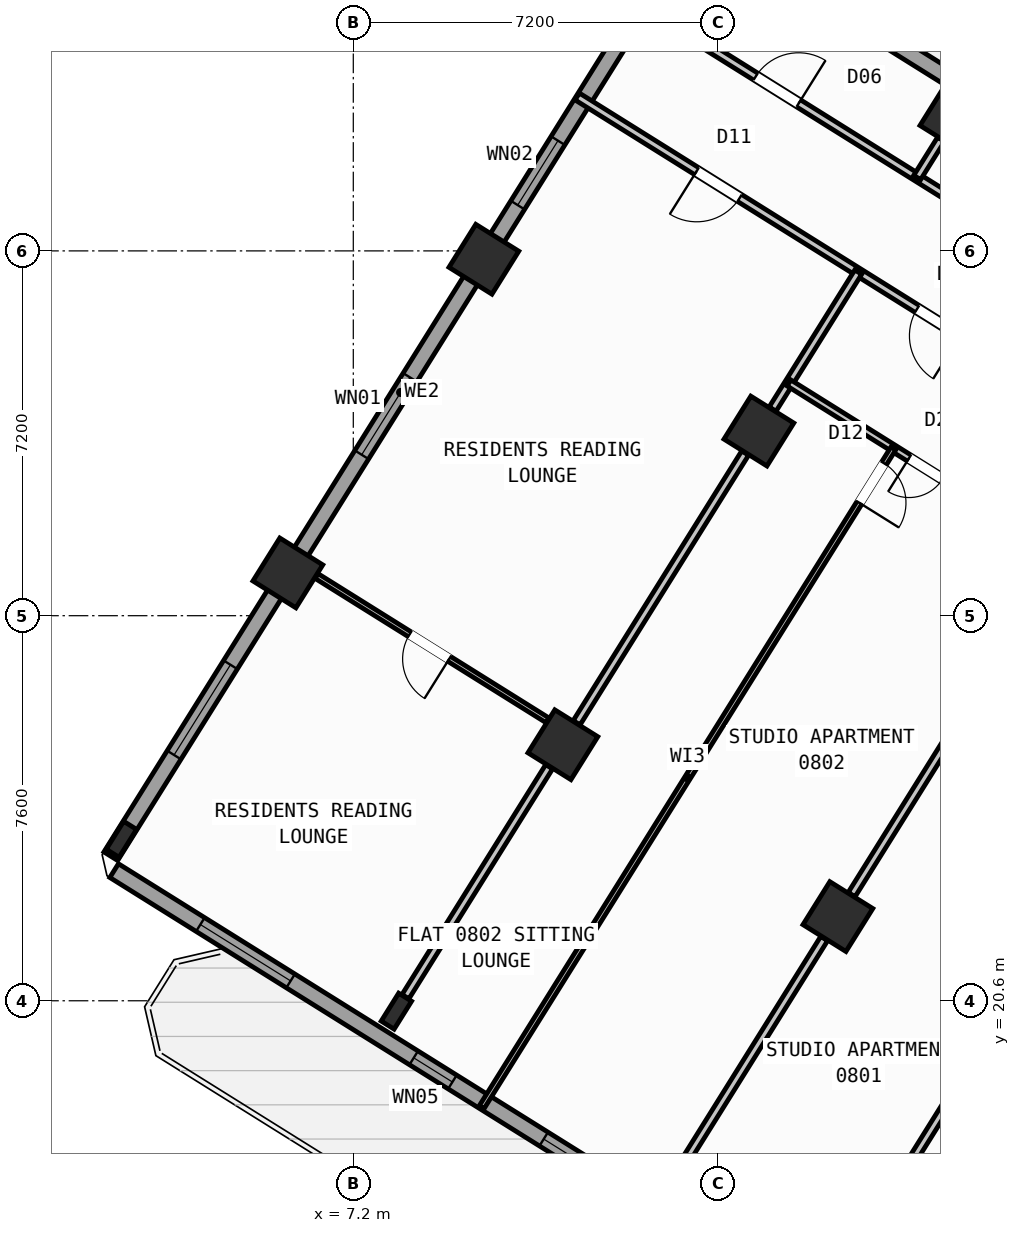
"""IFC4 building model, lengths in metres.
Left out: names, types, materials, properties, quantities, classifications, styles, units other than length and angle.
Written with IfcOpenShell. Run it as: python <this file> out.ifc"""

import sys

from ifc_helpers import new_model, si_unit, direction, frame, frame_2d, origin, origin_2d, place, context, subcontext, project, spatial, rectangle, hollow_rectangle, i_section, extrude, source, transform, mapped, element, fill, save


model = new_model("IFC4")
c1 = context("Model", 3, precision=1e-05, world=origin(), true_north=direction((0.0, 1.0)))
c2 = subcontext(c1, "Body", "Model", "MODEL_VIEW")
j1 = project(units=[si_unit("LENGTHUNIT", "METRE"), si_unit("PLANEANGLEUNIT", "RADIAN")], contexts=[c1])
p1 = place(None, origin())
s1 = spatial("IfcSite", under=j1, at=p1, CompositionType="ELEMENT")
p2 = place(p1, origin())
s2 = spatial("IfcBuilding", under=s1, at=p2, CompositionType="ELEMENT")
p3 = place(p2, frame((0.0, 0.0, 34.8)))
s3 = spatial("IfcBuildingStorey", under=s2, at=p3, CompositionType="ELEMENT", Elevation=34.8)
m1 = source(origin(), c2, "Body", "SweptSolid", [
    extrude(hollow_rectangle(XDim=1.0, YDim=1.0, WallThickness=0.04, at=origin_2d()), origin(), (0.0, 0.0, 1.0), 3.6),
])
for number, where, z_axis, x_axis in (
    (1, (16.764, 22.261, 0.0), (0.0, 0.0, 1.0), (-0.848, 0.53, 0.0)),
    (2, (19.073, 38.034, 0.0), (0.0, 0.0, 1.0), (-0.848, 0.53, 0.0)),
    (3, (15.205, 31.844, 0.0), (0.0, 0.0, 1.0), (-0.848, 0.53, 0.0)),
    (4, (11.336, 25.653, 0.0), (0.0, 0.0, 1.0), (-0.848, 0.53, 0.0)),
):
    element("IfcColumn", number, at=place(p3, frame(where, z_axis=z_axis, x_axis=x_axis)), inside=s3, PredefinedType="COLUMN", context=c2, shape_type="MappedRepresentation", body=[
        mapped(m1, transform((0.0, 0.0, 0.0), scale=1.0)),
    ])
m2 = source(origin(), c2, "Body", "SweptSolid", [
    extrude(i_section(OverallWidth=0.3, OverallDepth=0.65, WebThickness=0.016, FlangeThickness=0.031, at=origin_2d()), origin(), (0.0, 0.0, 1.0), 3.6),
])
p4 = place(p3, frame((8.051, 20.395, 0.0), z_axis=(0.0, 0.0, 1.0), x_axis=(-0.848048096156, 0.529919264233, 0.0)))
e5 = element("IfcColumn", 5, at=p4, inside=s3, PredefinedType="COLUMN", context=c2, shape_type="MappedRepresentation", body=[
    mapped(m2, transform((0.0, 0.0, 0.0), scale=1.0)),
])
for number, where, z_axis, x_axis in (
    (6, (9.777, 35.235, 0.0), (0.0, 0.0, 1.0), (-0.848, 0.53, 0.0)),
    (7, (5.909, 29.044, 0.0), (0.0, 0.0, 1.0), (-0.848, 0.53, 0.0)),
):
    element("IfcColumn", number, at=place(p3, frame(where, z_axis=z_axis, x_axis=x_axis)), inside=s3, PredefinedType="COLUMN", context=c2, shape_type="MappedRepresentation", body=[
        mapped(m1, transform((0.0, 0.0, 0.0), scale=1.0)),
    ])
p5 = place(p3, frame((2.623, 23.786, 0.0), z_axis=(0.0, 0.0, 1.0), x_axis=(-0.848048096156, 0.529919264233, 0.0)))
e8 = element("IfcColumn", 8, at=p5, inside=s3, PredefinedType="COLUMN", context=c2, shape_type="MappedRepresentation", body=[
    mapped(m2, transform((0.0, 0.0, 0.0), scale=1.0)),
])
p6 = place(p3, frame((29.268, 6.429, 0.0), z_axis=(0.0, 0.0, 1.0), x_axis=(-0.848049971435, 0.529916263149, 0.0)))
e9 = element("IfcWall", 9, at=p6, inside=s3, PredefinedType="STANDARD", context=c2, shape_type="SweptSolid", body=[
    extrude(rectangle(XDim=31.588, YDim=0.32, at=frame_2d((15.794, 0.0))), origin(), (0.0, 0.0, 1.0), 3.35),
])
p7 = place(p6, frame((16.362, 0.0, 0.0)))
e10 = element("IfcOpeningElement", 10, at=p7, cuts=e9, PredefinedType="OPENING", context=c2, shape_type="SweptSolid", body=[
    extrude(rectangle(XDim=1.2, YDim=2.15, at=frame_2d((0.6, 1.075))), frame((0.0, 0.17, 0.0), z_axis=(0.0, -1.0, 0.0), x_axis=(1.0, 0.0, 0.0)), (0.0, 0.0, 1.0), 0.34),
])
p8 = place(p6, frame((2.989, 0.0, 0.8)))
e11 = element("IfcOpeningElement", 11, at=p8, cuts=e9, PredefinedType="OPENING", context=c2, shape_type="SweptSolid", body=[
    extrude(rectangle(XDim=2.1, YDim=1.55, at=frame_2d((1.05, 0.775))), frame((0.0, 0.17, 0.0), z_axis=(0.0, -1.0, 0.0), x_axis=(1.0, 0.0, 0.0)), (0.0, 0.0, 1.0), 0.34),
])
p9 = place(p6, frame((8.359, 0.0, 0.8)))
e12 = element("IfcOpeningElement", 12, at=p9, cuts=e9, PredefinedType="OPENING", context=c2, shape_type="SweptSolid", body=[
    extrude(rectangle(XDim=2.1, YDim=1.55, at=frame_2d((1.05, 0.775))), frame((0.0, 0.17, 0.0), z_axis=(0.0, -1.0, 0.0), x_axis=(1.0, 0.0, 0.0)), (0.0, 0.0, 1.0), 0.34),
])
p10 = place(p6, frame((13.284, 0.0, 0.95)))
e13 = element("IfcOpeningElement", 13, at=p10, cuts=e9, PredefinedType="OPENING", context=c2, shape_type="SweptSolid", body=[
    extrude(rectangle(XDim=1.2, YDim=1.4, at=frame_2d((0.6, 0.7))), frame((0.0, 0.17, 0.0), z_axis=(0.0, -1.0, 0.0), x_axis=(1.0, 0.0, 0.0)), (0.0, 0.0, 1.0), 0.34),
])
p11 = place(p6, frame((20.39, 0.0, 0.95)))
e14 = element("IfcOpeningElement", 14, at=p11, cuts=e9, PredefinedType="OPENING", context=c2, shape_type="SweptSolid", body=[
    extrude(rectangle(XDim=1.2, YDim=1.4, at=frame_2d((0.6, 0.7))), frame((0.0, 0.17, 0.0), z_axis=(0.0, -1.0, 0.0), x_axis=(1.0, 0.0, 0.0)), (0.0, 0.0, 1.0), 0.34),
])
p12 = place(p6, frame((23.715, 0.0, 1.0)))
e15 = element("IfcOpeningElement", 15, at=p12, cuts=e9, PredefinedType="OPENING", context=c2, shape_type="SweptSolid", body=[
    extrude(rectangle(XDim=0.9, YDim=1.25, at=frame_2d((0.45, 0.625))), frame((0.0, 0.17, 0.0), z_axis=(0.0, -1.0, 0.0), x_axis=(1.0, 0.0, 0.0)), (0.0, 0.0, 1.0), 0.34),
])
p13 = place(p6, frame((27.481, 0.0, 0.8)))
e16 = element("IfcOpeningElement", 16, at=p13, cuts=e9, PredefinedType="OPENING", context=c2, shape_type="SweptSolid", body=[
    extrude(rectangle(XDim=2.1, YDim=1.55, at=frame_2d((1.05, 0.775))), frame((0.0, 0.17, 0.0), z_axis=(0.0, -1.0, 0.0), x_axis=(1.0, 0.0, 0.0)), (0.0, 0.0, 1.0), 0.34),
])
p14 = place(p3, frame((2.415, 23.452, 0.0), z_axis=(0.0, 0.0, 1.0), x_axis=(0.52991049553, 0.848053575387, 0.0)))
e17 = element("IfcWall", 17, at=p14, inside=s3, PredefinedType="STANDARD", context=c2, shape_type="SweptSolid", body=[
    extrude(rectangle(XDim=21.587, YDim=0.32, at=frame_2d((10.794, 0.0))), origin(), (0.0, 0.0, 1.0), 2.725),
])
p15 = place(p14, frame((2.356, 0.0, 0.8)))
e18 = element("IfcOpeningElement", 18, at=p15, cuts=e17, PredefinedType="OPENING", context=c2, shape_type="SweptSolid", body=[
    extrude(rectangle(XDim=2.1, YDim=1.55, at=frame_2d((1.05, 0.775))), frame((0.0, 0.17, 0.0), z_axis=(0.0, -1.0, 0.0), x_axis=(1.0, 0.0, 0.0)), (0.0, 0.0, 1.0), 0.34),
])
p16 = place(p14, frame((9.344, 0.0, 0.85)))
e19 = element("IfcOpeningElement", 19, at=p16, cuts=e17, PredefinedType="OPENING", context=c2, shape_type="SweptSolid", body=[
    extrude(rectangle(XDim=1.8, YDim=1.5, at=frame_2d((0.9, 0.75))), frame((0.0, 0.17, 0.0), z_axis=(0.0, -1.0, 0.0), x_axis=(1.0, 0.0, 0.0)), (0.0, 0.0, 1.0), 0.34),
])
p17 = place(p14, frame((15.154, 0.0, 0.85)))
e20 = element("IfcOpeningElement", 20, at=p17, cuts=e17, PredefinedType="OPENING", context=c2, shape_type="SweptSolid", body=[
    extrude(rectangle(XDim=1.5, YDim=1.5, at=frame_2d((0.75, 0.75))), frame((0.0, 0.17, 0.0), z_axis=(0.0, -1.0, 0.0), x_axis=(1.0, 0.0, 0.0)), (0.0, 0.0, 1.0), 0.34),
])
p18 = place(p3, frame((14.138, 41.825, 0.0), z_axis=(0.0, 0.0, 1.0), x_axis=(0.848046498049, -0.529921821731, 0.0)))
e21 = element("IfcWall", 21, at=p18, inside=s3, PredefinedType="STANDARD", context=c2, shape_type="SweptSolid", body=[
    extrude(rectangle(XDim=31.588, YDim=0.32, at=frame_2d((15.794, 0.0))), origin(), (0.0, 0.0, 1.0), 3.35),
])
p19 = place(p18, frame((3.369, 0.0, 0.0)))
e22 = element("IfcOpeningElement", 22, at=p19, cuts=e21, PredefinedType="OPENING", context=c2, shape_type="SweptSolid", body=[
    extrude(rectangle(XDim=1.05, YDim=2.15, at=frame_2d((0.525, 1.075))), frame((0.0, 0.17, 0.0), z_axis=(0.0, -1.0, 0.0), x_axis=(1.0, 0.0, 0.0)), (0.0, 0.0, 1.0), 0.34),
])
p20 = place(p18, frame((0.946, 0.0, 0.85)))
e23 = element("IfcOpeningElement", 23, at=p20, cuts=e21, PredefinedType="OPENING", context=c2, shape_type="SweptSolid", body=[
    extrude(rectangle(XDim=1.8, YDim=1.5, at=frame_2d((0.9, 0.75))), frame((0.0, 0.17, 0.0), z_axis=(0.0, -1.0, 0.0), x_axis=(1.0, 0.0, 0.0)), (0.0, 0.0, 1.0), 0.34),
])
p21 = place(p18, frame((8.46, 0.0, 0.85)))
e24 = element("IfcOpeningElement", 24, at=p21, cuts=e21, PredefinedType="OPENING", context=c2, shape_type="SweptSolid", body=[
    extrude(rectangle(XDim=1.8, YDim=1.5, at=frame_2d((0.9, 0.75))), frame((0.0, 0.17, 0.0), z_axis=(0.0, -1.0, 0.0), x_axis=(1.0, 0.0, 0.0)), (0.0, 0.0, 1.0), 0.34),
])
p22 = place(p18, frame((13.899, 0.0, 0.85)))
e25 = element("IfcOpeningElement", 25, at=p22, cuts=e21, PredefinedType="OPENING", context=c2, shape_type="SweptSolid", body=[
    extrude(rectangle(XDim=1.5, YDim=1.5, at=frame_2d((0.75, 0.75))), frame((0.0, 0.17, 0.0), z_axis=(0.0, -1.0, 0.0), x_axis=(1.0, 0.0, 0.0)), (0.0, 0.0, 1.0), 0.34),
])
p23 = place(p18, frame((22.019, 0.0, 0.95)))
e26 = element("IfcOpeningElement", 26, at=p23, cuts=e21, PredefinedType="OPENING", context=c2, shape_type="SweptSolid", body=[
    extrude(rectangle(XDim=1.2, YDim=1.4, at=frame_2d((0.6, 0.7))), frame((0.0, 0.17, 0.0), z_axis=(0.0, -1.0, 0.0), x_axis=(1.0, 0.0, 0.0)), (0.0, 0.0, 1.0), 0.34),
])
p24 = place(p18, frame((27.569, 0.0, 0.95)))
e27 = element("IfcOpeningElement", 27, at=p24, cuts=e21, PredefinedType="OPENING", context=c2, shape_type="SweptSolid", body=[
    extrude(rectangle(XDim=1.2, YDim=1.4, at=frame_2d((0.6, 0.7))), frame((0.0, 0.17, 0.0), z_axis=(0.0, -1.0, 0.0), x_axis=(1.0, 0.0, 0.0)), (0.0, 0.0, 1.0), 0.34),
])
p25 = place(p3, frame((25.807, 29.582, 0.0), z_axis=(0.0, 0.0, 1.0), x_axis=(-0.529918119251, -0.84804881162, 0.0)))
e28 = element("IfcWall", 28, at=p25, inside=s3, PredefinedType="PARTITIONING", context=c2, shape_type="SweptSolid", body=[
    extrude(rectangle(XDim=17.65, YDim=0.16, at=frame_2d((8.825, 0.0))), origin(), (0.0, 0.0, 1.0), 3.34),
])
p26 = place(p3, frame((26.973, 31.447, 0.0), z_axis=(0.0, 0.0, 1.0), x_axis=(-0.848048310262, 0.529918921593, 0.0)))
e29 = element("IfcWall", 29, at=p26, inside=s3, PredefinedType="PARTITIONING", context=c2, shape_type="SweptSolid", body=[
    extrude(rectangle(XDim=16.73, YDim=0.16, at=frame_2d((8.365, 0.0))), origin(), (0.0, 0.0, 1.0), 3.34),
])
p27 = place(p26, frame((1.588, 0.0, 0.0)))
e30 = element("IfcOpeningElement", 30, at=p27, cuts=e29, PredefinedType="OPENING", context=c2, shape_type="SweptSolid", body=[
    extrude(rectangle(XDim=1.0, YDim=2.1, at=frame_2d((0.5, 1.05))), frame((0.0, 0.09, 0.0), z_axis=(0.0, -1.0, 0.0), x_axis=(1.0, 0.0, 0.0)), (0.0, 0.0, 1.0), 0.18),
])
p28 = place(p26, frame((6.685, 0.0, 0.0)))
e31 = element("IfcOpeningElement", 31, at=p28, cuts=e29, PredefinedType="OPENING", context=c2, shape_type="SweptSolid", body=[
    extrude(rectangle(XDim=1.0, YDim=2.1, at=frame_2d((0.5, 1.05))), frame((0.0, 0.09, 0.0), z_axis=(0.0, -1.0, 0.0), x_axis=(1.0, 0.0, 0.0)), (0.0, 0.0, 1.0), 0.18),
])
p29 = place(p26, frame((12.951, 0.0, 0.0)))
e32 = element("IfcOpeningElement", 32, at=p29, cuts=e29, PredefinedType="OPENING", context=c2, shape_type="SweptSolid", body=[
    extrude(rectangle(XDim=1.0, YDim=2.1, at=frame_2d((0.5, 1.05))), frame((0.0, 0.09, 0.0), z_axis=(0.0, -1.0, 0.0), x_axis=(1.0, 0.0, 0.0)), (0.0, 0.0, 1.0), 0.18),
])
p30 = place(p3, frame((25.807, 29.582, 0.0), z_axis=(0.0, 0.0, 1.0), x_axis=(-0.848052408131, 0.529912363569, 0.0)))
e33 = element("IfcWall", 33, at=p30, inside=s3, PredefinedType="PARTITIONING", context=c2, shape_type="SweptSolid", body=[
    extrude(rectangle(XDim=16.73, YDim=0.16, at=frame_2d((8.365, 0.0))), origin(), (0.0, 0.0, 1.0), 3.34),
])
p31 = place(p30, frame((2.22, 0.0, 0.0)))
e34 = element("IfcOpeningElement", 34, at=p31, cuts=e33, PredefinedType="OPENING", context=c2, shape_type="SweptSolid", body=[
    extrude(rectangle(XDim=0.86, YDim=2.05, at=frame_2d((0.43, 1.025))), frame((0.0, 0.09, 0.0), z_axis=(0.0, -1.0, 0.0), x_axis=(1.0, 0.0, 0.0)), (0.0, 0.0, 1.0), 0.18),
])
p32 = place(p30, frame((7.82, 0.0, 0.0)))
e35 = element("IfcOpeningElement", 35, at=p32, cuts=e33, PredefinedType="OPENING", context=c2, shape_type="SweptSolid", body=[
    extrude(rectangle(XDim=1.0, YDim=2.1, at=frame_2d((0.5, 1.05))), frame((0.0, 0.09, 0.0), z_axis=(0.0, -1.0, 0.0), x_axis=(1.0, 0.0, 0.0)), (0.0, 0.0, 1.0), 0.18),
])
p33 = place(p30, frame((12.95, 0.0, 0.0)))
e36 = element("IfcOpeningElement", 36, at=p33, cuts=e33, PredefinedType="OPENING", context=c2, shape_type="SweptSolid", body=[
    extrude(rectangle(XDim=1.0, YDim=2.1, at=frame_2d((0.5, 1.05))), frame((0.0, 0.09, 0.0), z_axis=(0.0, -1.0, 0.0), x_axis=(1.0, 0.0, 0.0)), (0.0, 0.0, 1.0), 0.18),
])
p34 = place(p3, frame((20.361, 28.018, 0.0), z_axis=(0.0, 0.0, 1.0), x_axis=(-0.529915015264, -0.848050751193, 0.0)))
e37 = element("IfcWall", 37, at=p34, inside=s3, PredefinedType="PARTITIONING", context=c2, shape_type="SweptSolid", body=[
    extrude(rectangle(XDim=6.276, YDim=0.16, at=frame_2d((3.138, 0.0))), origin(), (0.0, 0.0, 1.0), 2.725),
])
p35 = place(p3, frame((16.492, 21.827, 0.0), z_axis=(0.0, 0.0, 1.0), x_axis=(-0.529904608059, -0.848057254175, 0.0)))
e38 = element("IfcWall", 38, at=p35, inside=s3, PredefinedType="PARTITIONING", context=c2, shape_type="SweptSolid", body=[
    extrude(rectangle(XDim=5.351, YDim=0.16, at=frame_2d((2.675, 0.0))), origin(), (0.0, 0.0, 1.0), 2.725),
])
p36 = place(p3, frame((17.165, 34.981, 0.0), z_axis=(0.0, 0.0, 1.0), x_axis=(-0.529930102756, -0.848041323399, 0.0)))
e39 = element("IfcWall", 39, at=p36, inside=s3, PredefinedType="PARTITIONING", context=c2, shape_type="SweptSolid", body=[
    extrude(rectangle(XDim=3.188, YDim=0.16, at=frame_2d((1.594, 0.0))), origin(), (0.0, 0.0, 1.0), 2.725),
])
p37 = place(p3, frame((14.933, 31.409, 0.0), z_axis=(0.0, 0.0, 1.0), x_axis=(-0.529897533635, -0.848061674554, 0.0)))
e40 = element("IfcWall", 40, at=p37, inside=s3, PredefinedType="PARTITIONING", context=c2, shape_type="SweptSolid", body=[
    extrude(rectangle(XDim=6.276, YDim=0.16, at=frame_2d((3.138, 0.0))), origin(), (0.0, 0.0, 1.0), 2.725),
])
p38 = place(p3, frame((11.065, 25.219, 0.0), z_axis=(0.0, 0.0, 1.0), x_axis=(-0.529904608059, -0.848057254175, 0.0)))
e41 = element("IfcWall", 41, at=p38, inside=s3, PredefinedType="PARTITIONING", context=c2, shape_type="SweptSolid", body=[
    extrude(rectangle(XDim=5.351, YDim=0.16, at=frame_2d((2.675, 0.0))), origin(), (0.0, 0.0, 1.0), 2.725),
])
p39 = place(p3, frame((21.226, 29.402, 0.0), z_axis=(0.0, 0.0, 1.0), x_axis=(-0.848039019877, 0.529933789039, 0.0)))
e42 = element("IfcWall", 42, at=p39, inside=s3, PredefinedType="PLUMBINGWALL", context=c2, shape_type="SweptSolid", body=[
    extrude(rectangle(XDim=6.4, YDim=0.14, at=frame_2d((3.2, 0.0))), origin(), (0.0, 0.0, 1.0), 3.34),
])
p40 = place(p39, frame((2.824, 0.0, 0.0)))
e43 = element("IfcOpeningElement", 43, at=p40, cuts=e42, PredefinedType="OPENING", context=c2, shape_type="SweptSolid", body=[
    extrude(rectangle(XDim=0.78, YDim=2.05, at=frame_2d((0.39, 1.025))), frame((0.0, 0.08, 0.0), z_axis=(0.0, -1.0, 0.0), x_axis=(1.0, 0.0, 0.0)), (0.0, 0.0, 1.0), 0.16),
])
p41 = place(p3, frame((17.861, 31.505, 0.0), z_axis=(0.0, 0.0, 1.0), x_axis=(-0.529928839727, -0.848042112649, 0.0)))
e44 = element("IfcWall", 44, at=p41, inside=s3, PredefinedType="PARTITIONING", context=c2, shape_type="SweptSolid", body=[
    extrude(rectangle(XDim=15.34, YDim=0.11, at=frame_2d((7.67, 0.0))), origin(), (0.0, 0.0, 1.0), 3.34),
])
p42 = place(p41, frame((0.35, 0.0, 0.0)))
e45 = element("IfcOpeningElement", 45, at=p42, cuts=e44, PredefinedType="OPENING", context=c2, shape_type="SweptSolid", body=[
    extrude(rectangle(XDim=0.92, YDim=2.08, at=frame_2d((0.46, 1.04))), frame((0.0, 0.065, 0.0), z_axis=(0.0, -1.0, 0.0), x_axis=(1.0, 0.0, 0.0)), (0.0, 0.0, 1.0), 0.13),
])
p43 = place(p3, frame((11.033, 26.135, 0.0), z_axis=(0.0, 0.0, 1.0), x_axis=(-0.848044224181, 0.529925460639, 0.0)))
e46 = element("IfcWall", 46, at=p43, inside=s3, PredefinedType="PARTITIONING", context=c2, shape_type="SweptSolid", body=[
    extrude(rectangle(XDim=5.376, YDim=0.11, at=frame_2d((2.688, 0.0))), origin(), (0.0, 0.0, 1.0), 2.725),
])
p44 = place(p43, frame((2.288, 0.0, 0.0)))
e47 = element("IfcOpeningElement", 47, at=p44, cuts=e46, PredefinedType="OPENING", context=c2, shape_type="SweptSolid", body=[
    extrude(rectangle(XDim=0.92, YDim=2.08, at=frame_2d((0.46, 1.04))), frame((0.0, 0.065, 0.0), z_axis=(0.0, -1.0, 0.0), x_axis=(1.0, 0.0, 0.0)), (0.0, 0.0, 1.0), 0.13),
])
p45 = place(p3, frame((18.799, 37.602, 0.0), z_axis=(0.0, 0.0, 1.0), x_axis=(-0.529974231203, -0.848013746505, 0.0)))
e48 = element("IfcWall", 48, at=p45, inside=s3, PredefinedType="PARTITIONING", context=c2, shape_type="SweptSolid", body=[
    extrude(rectangle(XDim=0.888, YDim=0.16, at=frame_2d((0.444, 0.0))), origin(), (0.0, 0.0, 1.0), 2.725),
])
m3 = source(origin(), c2, "Body", "SweptSolid", [
    extrude(rectangle(XDim=1.2, YDim=1.4, at=frame_2d((0.6, 0.7))), frame((0.0, 0.03, 0.0), z_axis=(0.0, -1.0, 0.0), x_axis=(1.0, 0.0, 0.0)), (0.0, 0.0, 1.0), 0.06),
])
p46 = place(p11, origin())
e49 = element("IfcWindow", 49, at=p46, inside=s3, PartitioningType="SINGLE_PANEL", PredefinedType="WINDOW", context=c2, shape_type="MappedRepresentation", body=[
    mapped(m3, transform((0.0, 0.0, 0.0), scale=1.0)),
])
fill(e14, e49)
m4 = source(origin(), c2, "Body", "SweptSolid", [
    extrude(rectangle(XDim=0.9, YDim=1.25, at=frame_2d((0.45, 0.625))), frame((0.0, 0.03, 0.0), z_axis=(0.0, -1.0, 0.0), x_axis=(1.0, 0.0, 0.0)), (0.0, 0.0, 1.0), 0.06),
])
p47 = place(p12, origin())
e50 = element("IfcWindow", 50, at=p47, inside=s3, PartitioningType="SINGLE_PANEL", PredefinedType="WINDOW", context=c2, shape_type="MappedRepresentation", body=[
    mapped(m4, transform((0.0, 0.0, 0.0), scale=1.0)),
])
fill(e15, e50)
m5 = source(origin(), c2, "Body", "SweptSolid", [
    extrude(rectangle(XDim=2.1, YDim=1.55, at=frame_2d((1.05, 0.775))), frame((0.0, 0.03, 0.0), z_axis=(0.0, -1.0, 0.0), x_axis=(1.0, 0.0, 0.0)), (0.0, 0.0, 1.0), 0.06),
])
p48 = place(p13, origin())
e51 = element("IfcWindow", 51, at=p48, inside=s3, PartitioningType="SINGLE_PANEL", PredefinedType="WINDOW", context=c2, shape_type="MappedRepresentation", body=[
    mapped(m5, transform((0.0, 0.0, 0.0), scale=1.0)),
])
fill(e16, e51)
p49 = place(p15, origin())
e52 = element("IfcWindow", 52, at=p49, inside=s3, PartitioningType="SINGLE_PANEL", PredefinedType="WINDOW", context=c2, shape_type="MappedRepresentation", body=[
    mapped(m5, transform((0.0, 0.0, 0.0), scale=1.0)),
])
fill(e18, e52)
m6 = source(origin(), c2, "Body", "SweptSolid", [
    extrude(rectangle(XDim=1.8, YDim=1.5, at=frame_2d((0.9, 0.75))), frame((0.0, 0.03, 0.0), z_axis=(0.0, -1.0, 0.0), x_axis=(1.0, 0.0, 0.0)), (0.0, 0.0, 1.0), 0.06),
])
p50 = place(p16, origin())
e53 = element("IfcWindow", 53, at=p50, inside=s3, PartitioningType="SINGLE_PANEL", PredefinedType="WINDOW", context=c2, shape_type="MappedRepresentation", body=[
    mapped(m6, transform((0.0, 0.0, 0.0), scale=1.0)),
])
fill(e19, e53)
m7 = source(origin(), c2, "Body", "SweptSolid", [
    extrude(rectangle(XDim=1.5, YDim=1.5, at=frame_2d((0.75, 0.75))), frame((0.0, 0.03, 0.0), z_axis=(0.0, -1.0, 0.0), x_axis=(1.0, 0.0, 0.0)), (0.0, 0.0, 1.0), 0.06),
])
p51 = place(p17, origin())
e54 = element("IfcWindow", 54, at=p51, inside=s3, PartitioningType="SINGLE_PANEL", PredefinedType="WINDOW", context=c2, shape_type="MappedRepresentation", body=[
    mapped(m7, transform((0.0, 0.0, 0.0), scale=1.0)),
])
fill(e20, e54)
m8 = source(origin(), c2, "Body", "SweptSolid", [
    extrude(rectangle(XDim=0.92, YDim=2.08, at=frame_2d((0.46, 1.04))), frame((0.0, 0.025, 0.0), z_axis=(0.0, -1.0, 0.0), x_axis=(1.0, 0.0, 0.0)), (0.0, 0.0, 1.0), 0.05),
])
p52 = place(p42, origin())
e55 = element("IfcDoor", 55, at=p52, inside=s3, OperationType="SINGLE_SWING_RIGHT", PredefinedType="DOOR", context=c2, shape_type="MappedRepresentation", body=[
    mapped(m8, transform((0.0, 0.0, 0.0), scale=1.0)),
])
fill(e45, e55)
m9 = source(origin(), c2, "Body", "SweptSolid", [
    extrude(rectangle(XDim=1.0, YDim=2.1, at=frame_2d((0.5, 1.05))), frame((0.0, 0.025, 0.0), z_axis=(0.0, -1.0, 0.0), x_axis=(1.0, 0.0, 0.0)), (0.0, 0.0, 1.0), 0.05),
])
p53 = place(p32, origin())
e56 = element("IfcDoor", 56, at=p53, inside=s3, OperationType="SINGLE_SWING_LEFT", PredefinedType="DOOR", context=c2, shape_type="MappedRepresentation", body=[
    mapped(m9, transform((0.0, 0.0, 0.0), scale=1.0)),
])
fill(e35, e56)
m10 = source(origin(), c2, "Body", "SweptSolid", [
    extrude(rectangle(XDim=0.78, YDim=2.05, at=frame_2d((0.39, 1.025))), frame((0.0, 0.025, 0.0), z_axis=(0.0, -1.0, 0.0), x_axis=(1.0, 0.0, 0.0)), (0.0, 0.0, 1.0), 0.05),
])
p54 = place(p40, origin())
e57 = element("IfcDoor", 57, at=p54, inside=s3, OperationType="SINGLE_SWING_RIGHT", PredefinedType="DOOR", context=c2, shape_type="MappedRepresentation", body=[
    mapped(m10, transform((0.0, 0.0, 0.0), scale=1.0)),
])
fill(e43, e57)
p55 = place(p33, origin())
e58 = element("IfcDoor", 58, at=p55, inside=s3, OperationType="SINGLE_SWING_RIGHT", PredefinedType="DOOR", context=c2, shape_type="MappedRepresentation", body=[
    mapped(m9, transform((0.0, 0.0, 0.0), scale=1.0)),
])
fill(e36, e58)
p56 = place(p44, origin())
e59 = element("IfcDoor", 59, at=p56, inside=s3, OperationType="SINGLE_SWING_LEFT", PredefinedType="DOOR", context=c2, shape_type="MappedRepresentation", body=[
    mapped(m8, transform((0.0, 0.0, 0.0), scale=1.0)),
])
fill(e47, e59)
p57 = place(p29, frame((1.0, 0.0, 0.0), z_axis=(0.0, 0.0, 1.0), x_axis=(-1.0, 0.0, 0.0)))
e60 = element("IfcDoor", 60, at=p57, inside=s3, OperationType="SINGLE_SWING_RIGHT", PredefinedType="DOOR", context=c2, shape_type="MappedRepresentation", body=[
    mapped(m9, transform((0.0, 0.0, 0.0), scale=1.0)),
])
fill(e32, e60)
save(model, sys.argv[1])
